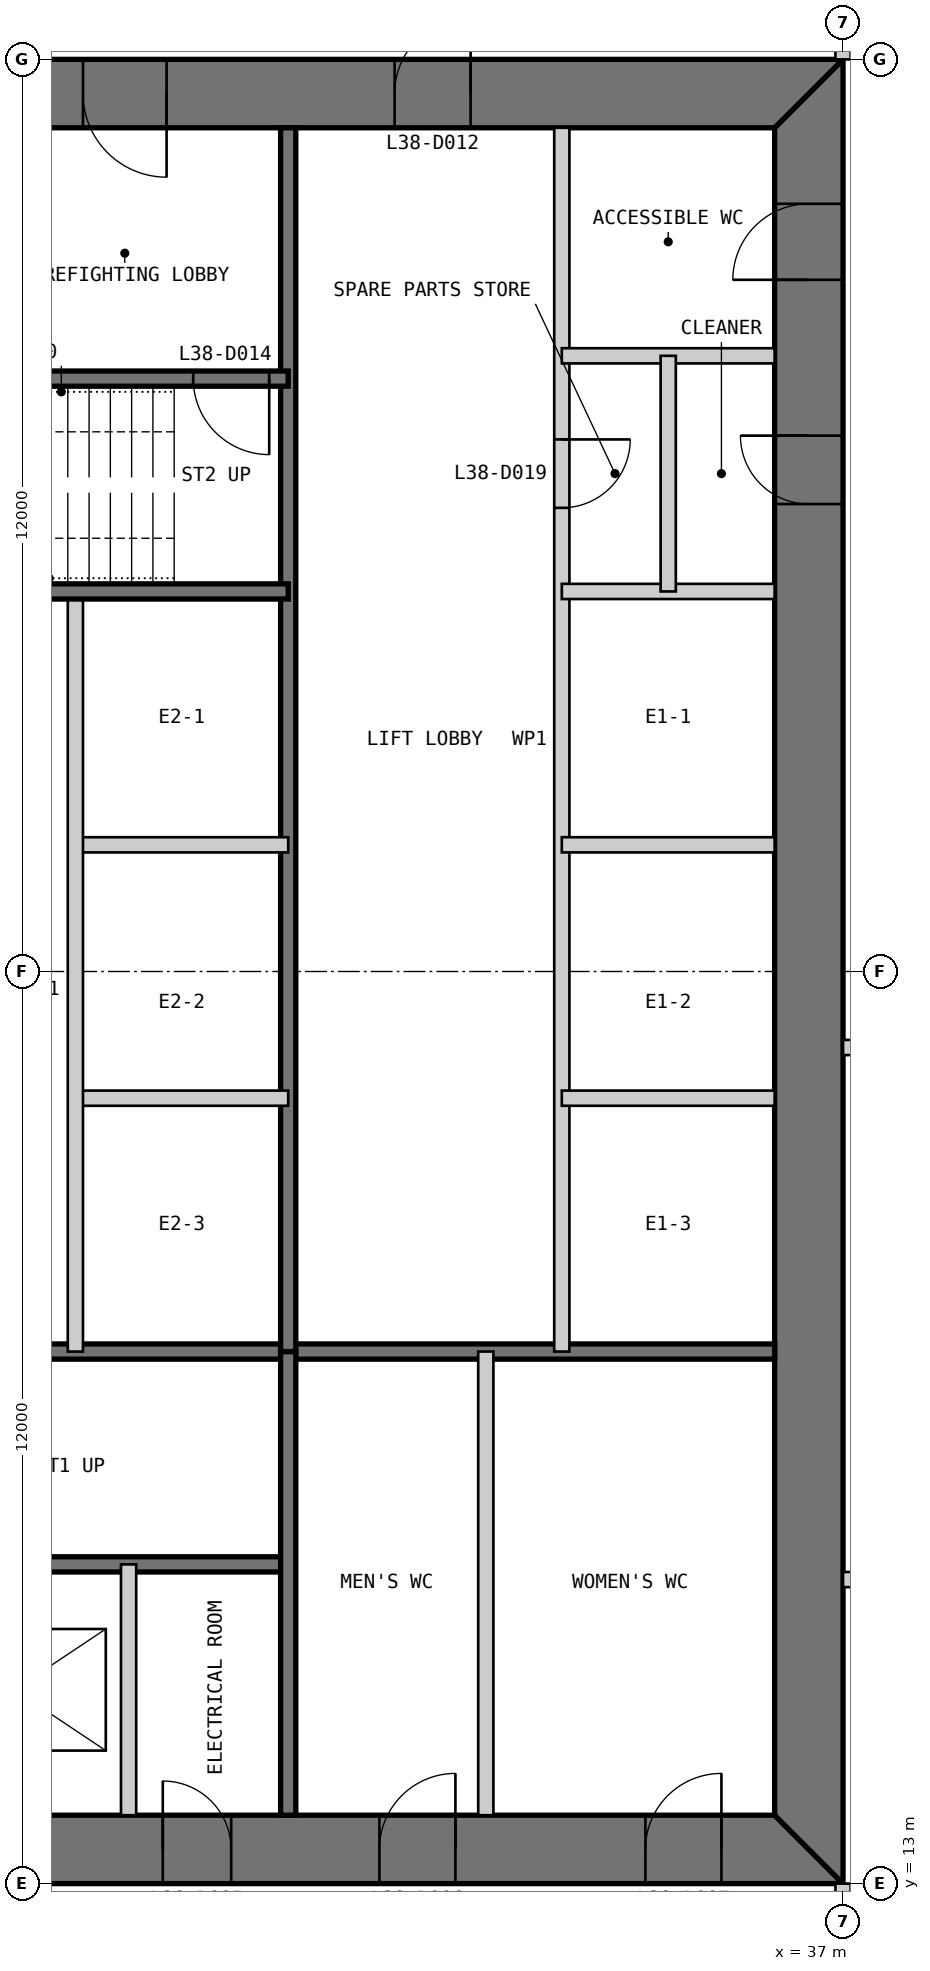
"""IFC4 building model, lengths in metres.
Left out: names, types, materials, properties, quantities, classifications, styles, units other than length and angle.
Written with IfcOpenShell. Run it as: python <this file> out.ifc"""

import sys

from ifc_helpers import new_model, si_unit, direction, frame, frame_2d, origin, place, context, subcontext, project, spatial, polyline, rectangle, outline, extrude, element, fill, save


model = new_model("IFC4")
c1 = context("Model", 3, precision=1e-05, world=origin(), true_north=direction((0.0, 1.0)))
c2 = subcontext(c1, "Body", "Model", "MODEL_VIEW")
j1 = project(units=[si_unit("LENGTHUNIT", "METRE"), si_unit("PLANEANGLEUNIT", "RADIAN")], contexts=[c1])
p1 = place(None, origin())
s1 = spatial("IfcSite", under=j1, at=p1, CompositionType="ELEMENT")
p2 = place(p1, origin())
s2 = spatial("IfcBuilding", under=s1, at=p2, CompositionType="ELEMENT")
p3 = place(p2, frame((0.0, 0.0, 162.4)))
s3 = spatial("IfcBuildingStorey", under=s2, at=p3, CompositionType="ELEMENT", Elevation=162.4)
p4 = place(p3, frame((13.0, 13.45, 0.0), z_axis=(0.0, 0.0, 1.0), x_axis=(1.0, 0.0, 0.0)))
e1 = element("IfcWall", 1, at=p4, inside=s3, PredefinedType="SHEAR", context=c2, shape_type="SweptSolid", body=[
    extrude(outline(polyline([(0.0, -0.45), (24.0, -0.45), (23.1, 0.45), (0.9, 0.45), (0.0, -0.45)])), origin(), (0.0, 0.0, 1.0), 6.0),
])
p5 = place(p4, frame((4.9, 0.0, 0.0)))
e2 = element("IfcOpeningElement", 2, at=p5, cuts=e1, PredefinedType="OPENING", context=c2, shape_type="SweptSolid", body=[
    extrude(rectangle(XDim=1.0, YDim=2.2, at=frame_2d((0.5, 1.1))), frame((0.0, 0.46, 0.0), z_axis=(0.0, -1.0, 0.0), x_axis=(1.0, 0.0, 0.0)), (0.0, 0.0, 1.0), 0.92),
])
p6 = place(p4, frame((8.9, 0.0, 0.0)))
e3 = element("IfcOpeningElement", 3, at=p6, cuts=e1, PredefinedType="OPENING", context=c2, shape_type="SweptSolid", body=[
    extrude(rectangle(XDim=1.1, YDim=2.2, at=frame_2d((0.55, 1.1))), frame((0.0, 0.46, 0.0), z_axis=(0.0, -1.0, 0.0), x_axis=(1.0, 0.0, 0.0)), (0.0, 0.0, 1.0), 0.92),
])
p7 = place(p4, frame((15.05, 0.0, 0.0)))
e4 = element("IfcOpeningElement", 4, at=p7, cuts=e1, PredefinedType="OPENING", context=c2, shape_type="SweptSolid", body=[
    extrude(rectangle(XDim=0.9, YDim=2.2, at=frame_2d((0.45, 1.1))), frame((0.0, 0.46, 0.0), z_axis=(0.0, -1.0, 0.0), x_axis=(1.0, 0.0, 0.0)), (0.0, 0.0, 1.0), 0.92),
])
p8 = place(p4, frame((17.9, 0.0, 0.0)))
e5 = element("IfcOpeningElement", 5, at=p8, cuts=e1, PredefinedType="OPENING", context=c2, shape_type="SweptSolid", body=[
    extrude(rectangle(XDim=1.0, YDim=2.2, at=frame_2d((0.5, 1.1))), frame((0.0, 0.46, 0.0), z_axis=(0.0, -1.0, 0.0), x_axis=(1.0, 0.0, 0.0)), (0.0, 0.0, 1.0), 0.92),
])
p9 = place(p4, frame((21.4, 0.0, 0.0)))
e6 = element("IfcOpeningElement", 6, at=p9, cuts=e1, PredefinedType="OPENING", context=c2, shape_type="SweptSolid", body=[
    extrude(rectangle(XDim=1.0, YDim=2.2, at=frame_2d((0.5, 1.1))), frame((0.0, 0.46, 0.0), z_axis=(0.0, -1.0, 0.0), x_axis=(1.0, 0.0, 0.0)), (0.0, 0.0, 1.0), 0.92),
])
p10 = place(p3, frame((36.55, 13.9, 0.0), z_axis=(0.0, 0.0, 1.0), x_axis=(0.0, 1.0, 0.0)))
e7 = element("IfcWall", 7, at=p10, inside=s3, PredefinedType="SHEAR", context=c2, shape_type="SweptSolid", body=[
    extrude(outline(polyline([(-0.9, -0.45), (23.1, -0.45), (22.2, 0.45), (0.0, 0.45), (-0.9, -0.45)])), origin(), (0.0, 0.0, 1.0), 6.0),
])
p11 = place(p10, frame((20.2, 0.0, 0.0)))
e8 = element("IfcOpeningElement", 8, at=p11, cuts=e7, PredefinedType="OPENING", context=c2, shape_type="SweptSolid", body=[
    extrude(rectangle(XDim=1.0, YDim=2.2, at=frame_2d((0.5, 1.1))), frame((0.0, 0.46, 0.0), z_axis=(0.0, -1.0, 0.0), x_axis=(1.0, 0.0, 0.0)), (0.0, 0.0, 1.0), 0.92),
])
p12 = place(p10, frame((17.25, 0.0, 0.0)))
e9 = element("IfcOpeningElement", 9, at=p12, cuts=e7, PredefinedType="OPENING", context=c2, shape_type="SweptSolid", body=[
    extrude(rectangle(XDim=0.9, YDim=2.2, at=frame_2d((0.45, 1.1))), frame((0.0, 0.46, 0.0), z_axis=(0.0, -1.0, 0.0), x_axis=(1.0, 0.0, 0.0)), (0.0, 0.0, 1.0), 0.92),
])
p13 = place(p3, frame((37.0, 36.55, 0.0), z_axis=(0.0, 0.0, 1.0), x_axis=(-1.0, 0.0, 0.0)))
e10 = element("IfcWall", 10, at=p13, inside=s3, PredefinedType="SHEAR", context=c2, shape_type="SweptSolid", body=[
    extrude(outline(polyline([(0.0, -0.45), (24.0, -0.45), (23.1, 0.45), (0.9, 0.45), (0.0, -0.45)])), origin(), (0.0, 0.0, 1.0), 6.0),
])
p14 = place(p13, frame((4.9, 0.0, 0.0)))
e11 = element("IfcOpeningElement", 11, at=p14, cuts=e10, PredefinedType="OPENING", context=c2, shape_type="SweptSolid", body=[
    extrude(rectangle(XDim=1.0, YDim=2.2, at=frame_2d((0.5, 1.1))), frame((0.0, 0.46, 0.0), z_axis=(0.0, -1.0, 0.0), x_axis=(1.0, 0.0, 0.0)), (0.0, 0.0, 1.0), 0.92),
])
p15 = place(p13, frame((8.9, 0.0, 0.0)))
e12 = element("IfcOpeningElement", 12, at=p15, cuts=e10, PredefinedType="OPENING", context=c2, shape_type="SweptSolid", body=[
    extrude(rectangle(XDim=1.1, YDim=2.2, at=frame_2d((0.55, 1.1))), frame((0.0, 0.46, 0.0), z_axis=(0.0, -1.0, 0.0), x_axis=(1.0, 0.0, 0.0)), (0.0, 0.0, 1.0), 0.92),
])
p16 = place(p13, frame((15.05, 0.0, 0.0)))
e13 = element("IfcOpeningElement", 13, at=p16, cuts=e10, PredefinedType="OPENING", context=c2, shape_type="SweptSolid", body=[
    extrude(rectangle(XDim=0.9, YDim=2.2, at=frame_2d((0.45, 1.1))), frame((0.0, 0.46, 0.0), z_axis=(0.0, -1.0, 0.0), x_axis=(1.0, 0.0, 0.0)), (0.0, 0.0, 1.0), 0.92),
])
p17 = place(p13, frame((17.9, 0.0, 0.0)))
e14 = element("IfcOpeningElement", 14, at=p17, cuts=e10, PredefinedType="OPENING", context=c2, shape_type="SweptSolid", body=[
    extrude(rectangle(XDim=1.0, YDim=2.2, at=frame_2d((0.5, 1.1))), frame((0.0, 0.46, 0.0), z_axis=(0.0, -1.0, 0.0), x_axis=(1.0, 0.0, 0.0)), (0.0, 0.0, 1.0), 0.92),
])
p18 = place(p13, frame((21.4, 0.0, 0.0)))
e15 = element("IfcOpeningElement", 15, at=p18, cuts=e10, PredefinedType="OPENING", context=c2, shape_type="SweptSolid", body=[
    extrude(rectangle(XDim=1.0, YDim=2.2, at=frame_2d((0.5, 1.1))), frame((0.0, 0.46, 0.0), z_axis=(0.0, -1.0, 0.0), x_axis=(1.0, 0.0, 0.0)), (0.0, 0.0, 1.0), 0.92),
])
p19 = place(p3, frame((20.3, 17.2, 0.0), z_axis=(0.0, 0.0, 1.0), x_axis=(1.0, 0.0, 0.0)))
e16 = element("IfcWall", 16, at=p19, inside=s3, PredefinedType="SOLIDWALL", context=c2, shape_type="SweptSolid", body=[
    extrude(rectangle(XDim=9.4, YDim=0.2, at=frame_2d((4.7, 0.0))), origin(), (0.0, 0.0, 1.0), 5.8),
])
p20 = place(p19, frame((0.25, 0.0, 0.0)))
e17 = element("IfcOpeningElement", 17, at=p20, cuts=e16, PredefinedType="OPENING", context=c2, shape_type="SweptSolid", body=[
    extrude(rectangle(XDim=1.0, YDim=2.2, at=frame_2d((0.5, 1.1))), frame((0.0, 0.11, 0.0), z_axis=(0.0, -1.0, 0.0), x_axis=(1.0, 0.0, 0.0)), (0.0, 0.0, 1.0), 0.22),
])
p21 = place(p3, frame((20.3, 20.0, 0.0), z_axis=(0.0, 0.0, 1.0), x_axis=(1.0, 0.0, 0.0)))
e18 = element("IfcWall", 18, at=p21, inside=s3, PredefinedType="SOLIDWALL", context=c2, shape_type="SweptSolid", body=[
    extrude(rectangle(XDim=15.8, YDim=0.2, at=frame_2d((7.9, 0.0))), origin(), (0.0, 0.0, 1.0), 5.8),
])
p22 = place(p3, frame((27.6, 13.9, 0.0), z_axis=(0.0, 0.0, 1.0), x_axis=(0.0, 1.0, 0.0)))
e19 = element("IfcWall", 19, at=p22, inside=s3, PredefinedType="PARTITIONING", context=c2, shape_type="SweptSolid", body=[
    extrude(rectangle(XDim=3.3, YDim=0.2, at=frame_2d((1.65, 0.0))), origin(), (0.0, 0.0, 1.0), 5.8),
])
p23 = place(p3, frame((29.7, 13.9, 0.0), z_axis=(0.0, 0.0, 1.0), x_axis=(0.0, 1.0, 0.0)))
e20 = element("IfcWall", 20, at=p23, inside=s3, PredefinedType="SOLIDWALL", context=c2, shape_type="SweptSolid", body=[
    extrude(rectangle(XDim=6.1, YDim=0.2, at=frame_2d((3.05, 0.0))), origin(), (0.0, 0.0, 1.0), 5.8),
])
p24 = place(p3, frame((32.3, 13.9, 0.0), z_axis=(0.0, 0.0, 1.0), x_axis=(0.0, 1.0, 0.0)))
e21 = element("IfcWall", 21, at=p24, inside=s3, PredefinedType="PARTITIONING", context=c2, shape_type="SweptSolid", body=[
    extrude(rectangle(XDim=6.1, YDim=0.2, at=frame_2d((3.05, 0.0))), origin(), (0.0, 0.0, 1.0), 5.8),
])
p25 = place(p3, frame((33.3, 36.1, 0.0), z_axis=(0.0, 0.0, 1.0), x_axis=(0.0, -1.0, 0.0)))
e22 = element("IfcWall", 22, at=p25, inside=s3, PredefinedType="PARTITIONING", context=c2, shape_type="SweptSolid", body=[
    extrude(rectangle(XDim=16.1, YDim=0.2, at=frame_2d((8.05, 0.0))), origin(), (0.0, 0.0, 1.0), 5.8),
])
p26 = place(p25, frame((4.1, 0.0, 0.0)))
e23 = element("IfcOpeningElement", 23, at=p26, cuts=e22, PredefinedType="OPENING", context=c2, shape_type="SweptSolid", body=[
    extrude(rectangle(XDim=0.9, YDim=2.2, at=frame_2d((0.45, 1.1))), frame((0.0, 0.11, 0.0), z_axis=(0.0, -1.0, 0.0), x_axis=(1.0, 0.0, 0.0)), (0.0, 0.0, 1.0), 0.22),
])
p27 = place(p3, frame((29.7, 36.1, 0.0), z_axis=(0.0, 0.0, 1.0), x_axis=(0.0, -1.0, 0.0)))
e24 = element("IfcWall", 24, at=p27, inside=s3, PredefinedType="SOLIDWALL", context=c2, shape_type="SweptSolid", body=[
    extrude(rectangle(XDim=16.1, YDim=0.2, at=frame_2d((8.05, 0.0))), origin(), (0.0, 0.0, 1.0), 5.8),
])
for number, where, z_axis, x_axis in (
    (25, (36.1, 30.0, 0.0), (0.0, 0.0, 1.0), (-1.0, 0.0, 0.0)),
    (26, (36.1, 26.667, 0.0), (0.0, 0.0, 1.0), (-1.0, 0.0, 0.0)),
    (27, (36.1, 23.333, 0.0), (0.0, 0.0, 1.0), (-1.0, 0.0, 0.0)),
    (28, (29.7, 26.667, 0.0), (0.0, 0.0, 1.0), (-1.0, 0.0, 0.0)),
    (29, (29.7, 23.333, 0.0), (0.0, 0.0, 1.0), (-1.0, 0.0, 0.0)),
):
    element("IfcWall", number, at=place(p3, frame(where, z_axis=z_axis, x_axis=x_axis)), inside=s3, PredefinedType="PARTITIONING", context=c2, shape_type="SweptSolid", body=[
        extrude(rectangle(XDim=2.8, YDim=0.2, at=frame_2d((1.4, 0.0))), origin(), (0.0, 0.0, 1.0), 5.8),
    ])
p28 = place(p3, frame((26.9, 30.0, 0.0), z_axis=(0.0, 0.0, 1.0), x_axis=(0.0, -1.0, 0.0)))
e30 = element("IfcWall", 30, at=p28, inside=s3, PredefinedType="PARTITIONING", context=c2, shape_type="SweptSolid", body=[
    extrude(rectangle(XDim=10.0, YDim=0.2, at=frame_2d((5.0, 0.0))), origin(), (0.0, 0.0, 1.0), 5.8),
])
p29 = place(p3, frame((29.7, 32.8, 0.0), z_axis=(0.0, 0.0, 1.0), x_axis=(-1.0, 0.0, 0.0)))
e31 = element("IfcWall", 31, at=p29, inside=s3, PredefinedType="SOLIDWALL", context=c2, shape_type="SweptSolid", body=[
    extrude(rectangle(XDim=9.4, YDim=0.2, at=frame_2d((4.7, 0.0))), origin(), (0.0, 0.0, 1.0), 5.8),
])
p30 = place(p29, frame((0.25, 0.0, 0.0)))
e32 = element("IfcOpeningElement", 32, at=p30, cuts=e31, PredefinedType="OPENING", context=c2, shape_type="SweptSolid", body=[
    extrude(rectangle(XDim=1.0, YDim=2.2, at=frame_2d((0.5, 1.1))), frame((0.0, 0.11, 0.0), z_axis=(0.0, -1.0, 0.0), x_axis=(1.0, 0.0, 0.0)), (0.0, 0.0, 1.0), 0.22),
])
p31 = place(p3, frame((29.7, 30.0, 0.0), z_axis=(0.0, 0.0, 1.0), x_axis=(-1.0, 0.0, 0.0)))
e33 = element("IfcWall", 33, at=p31, inside=s3, PredefinedType="SOLIDWALL", context=c2, shape_type="SweptSolid", body=[
    extrude(rectangle(XDim=15.8, YDim=0.2, at=frame_2d((7.9, 0.0))), origin(), (0.0, 0.0, 1.0), 5.8),
])
p32 = place(p3, frame((36.1, 33.1, 0.0), z_axis=(0.0, 0.0, 1.0), x_axis=(-1.0, 0.0, 0.0)))
e34 = element("IfcWall", 34, at=p32, inside=s3, PredefinedType="PARTITIONING", context=c2, shape_type="SweptSolid", body=[
    extrude(rectangle(XDim=2.8, YDim=0.2, at=frame_2d((1.4, 0.0))), origin(), (0.0, 0.0, 1.0), 5.8),
])
p33 = place(p3, frame((34.7, 33.1, 0.0), z_axis=(0.0, 0.0, 1.0), x_axis=(0.0, -1.0, 0.0)))
e35 = element("IfcWall", 35, at=p33, inside=s3, PredefinedType="PARTITIONING", context=c2, shape_type="SweptSolid", body=[
    extrude(rectangle(XDim=3.1, YDim=0.2, at=frame_2d((1.55, 0.0))), origin(), (0.0, 0.0, 1.0), 5.8),
])
p34 = place(p3, frame((37.0, 44.0, 0.0), z_axis=(0.0, 0.0, 1.0), x_axis=(0.0, -1.0, 0.0)))
e36 = element("IfcWall", 36, at=p34, inside=s3, PredefinedType="PARTITIONING", context=c2, shape_type="SweptSolid", body=[
    extrude(rectangle(XDim=7.0, YDim=0.2, at=frame_2d((3.5, 0.0))), origin(), (0.0, 0.0, 1.0), 4.807),
])
p35 = place(p3, frame((37.0, 10.6, 0.0), z_axis=(0.0, 0.0, 1.0), x_axis=(0.0, 1.0, 0.0)))
e37 = element("IfcWall", 37, at=p35, inside=s3, PredefinedType="PARTITIONING", context=c2, shape_type="SweptSolid", body=[
    extrude(rectangle(XDim=2.4, YDim=0.2, at=frame_2d((1.2, 0.0))), origin(), (0.0, 0.0, 1.0), 4.807),
])
p36 = place(p3, frame((37.0, 17.0, 0.0), z_axis=(0.0, 0.0, 1.0), x_axis=(1.0, 0.0, 0.0)))
e38 = element("IfcWall", 38, at=p36, inside=s3, PredefinedType="PARTITIONING", context=c2, shape_type="SweptSolid", body=[
    extrude(rectangle(XDim=11.0, YDim=0.2, at=frame_2d((5.5, 0.0))), origin(), (0.0, 0.0, 1.0), 5.8),
])
p37 = place(p36, frame((4.6, 0.0, 0.0)))
e39 = element("IfcOpeningElement", 39, at=p37, cuts=e38, PredefinedType="OPENING", context=c2, shape_type="SweptSolid", body=[
    extrude(rectangle(XDim=1.8, YDim=2.4, at=frame_2d((0.9, 1.2))), frame((0.0, 0.11, 0.0), z_axis=(0.0, -1.0, 0.0), x_axis=(1.0, 0.0, 0.0)), (0.0, 0.0, 1.0), 0.22),
])
p38 = place(p3, frame((37.0, 24.0, 0.0), z_axis=(0.0, 0.0, 1.0), x_axis=(1.0, 0.0, 0.0)))
e40 = element("IfcWall", 40, at=p38, inside=s3, PredefinedType="PARTITIONING", context=c2, shape_type="SweptSolid", body=[
    extrude(rectangle(XDim=11.0, YDim=0.2, at=frame_2d((5.5, 0.0))), origin(), (0.0, 0.0, 1.0), 5.8),
])
p39 = place(p38, frame((4.6, 0.0, 0.0)))
e41 = element("IfcOpeningElement", 41, at=p39, cuts=e40, PredefinedType="OPENING", context=c2, shape_type="SweptSolid", body=[
    extrude(rectangle(XDim=1.8, YDim=2.4, at=frame_2d((0.9, 1.2))), frame((0.0, 0.11, 0.0), z_axis=(0.0, -1.0, 0.0), x_axis=(1.0, 0.0, 0.0)), (0.0, 0.0, 1.0), 0.22),
])
p40 = place(p7, origin())
e42 = element("IfcDoor", 42, at=p40, inside=s3, OperationType="SINGLE_SWING_LEFT", PredefinedType="DOOR", context=c2, shape_type="SweptSolid", body=[
    extrude(rectangle(XDim=0.9, YDim=2.2, at=frame_2d((0.45, 1.1))), frame((0.0, 0.025, 0.0), z_axis=(0.0, -1.0, 0.0), x_axis=(1.0, 0.0, 0.0)), (0.0, 0.0, 1.0), 0.05),
    extrude(outline(polyline([(0.0, 0.0), (0.04, 0.0), (0.04, 2.16), (0.86, 2.16), (0.86, 0.0), (0.9, 0.0), (0.9, 2.2), (0.0, 2.2), (0.0, 0.0)])), frame((0.0, 0.3, 0.0), z_axis=(0.0, -1.0, 0.0), x_axis=(1.0, 0.0, 0.0)), (0.0, 0.0, 1.0), 0.6),
])
fill(e4, e42)
p41 = place(p8, origin())
e43 = element("IfcDoor", 43, at=p41, inside=s3, OperationType="SINGLE_SWING_RIGHT", PredefinedType="DOOR", context=c2, shape_type="SweptSolid", body=[
    extrude(rectangle(XDim=1.0, YDim=2.2, at=frame_2d((0.5, 1.1))), frame((0.0, 0.025, 0.0), z_axis=(0.0, -1.0, 0.0), x_axis=(1.0, 0.0, 0.0)), (0.0, 0.0, 1.0), 0.05),
    extrude(outline(polyline([(0.0, 0.0), (0.04, 0.0), (0.04, 2.16), (0.96, 2.16), (0.96, 0.0), (1.0, 0.0), (1.0, 2.2), (0.0, 2.2), (0.0, 0.0)])), frame((0.0, 0.3, 0.0), z_axis=(0.0, -1.0, 0.0), x_axis=(1.0, 0.0, 0.0)), (0.0, 0.0, 1.0), 0.6),
])
fill(e5, e43)
p42 = place(p9, origin())
e44 = element("IfcDoor", 44, at=p42, inside=s3, OperationType="SINGLE_SWING_RIGHT", PredefinedType="DOOR", context=c2, shape_type="SweptSolid", body=[
    extrude(rectangle(XDim=1.0, YDim=2.2, at=frame_2d((0.5, 1.1))), frame((0.0, 0.025, 0.0), z_axis=(0.0, -1.0, 0.0), x_axis=(1.0, 0.0, 0.0)), (0.0, 0.0, 1.0), 0.05),
    extrude(outline(polyline([(0.0, 0.0), (0.04, 0.0), (0.04, 2.16), (0.96, 2.16), (0.96, 0.0), (1.0, 0.0), (1.0, 2.2), (0.0, 2.2), (0.0, 0.0)])), frame((0.0, 0.3, 0.0), z_axis=(0.0, -1.0, 0.0), x_axis=(1.0, 0.0, 0.0)), (0.0, 0.0, 1.0), 0.6),
])
fill(e6, e44)
p43 = place(p14, frame((1.0, 0.0, 0.0), z_axis=(0.0, 0.0, 1.0), x_axis=(-1.0, 0.0, 0.0)))
e45 = element("IfcDoor", 45, at=p43, inside=s3, OperationType="SINGLE_SWING_RIGHT", PredefinedType="DOOR", context=c2, shape_type="SweptSolid", body=[
    extrude(rectangle(XDim=1.0, YDim=2.2, at=frame_2d((0.5, 1.1))), frame((0.0, 0.025, 0.0), z_axis=(0.0, -1.0, 0.0), x_axis=(1.0, 0.0, 0.0)), (0.0, 0.0, 1.0), 0.05),
    extrude(outline(polyline([(0.0, 0.0), (0.04, 0.0), (0.04, 2.16), (0.96, 2.16), (0.96, 0.0), (1.0, 0.0), (1.0, 2.2), (0.0, 2.2), (0.0, 0.0)])), frame((0.0, 0.3, 0.0), z_axis=(0.0, -1.0, 0.0), x_axis=(1.0, 0.0, 0.0)), (0.0, 0.0, 1.0), 0.6),
])
fill(e11, e45)
p44 = place(p15, origin())
e46 = element("IfcDoor", 46, at=p44, inside=s3, OperationType="SINGLE_SWING_LEFT", PredefinedType="DOOR", context=c2, shape_type="SweptSolid", body=[
    extrude(rectangle(XDim=1.1, YDim=2.2, at=frame_2d((0.55, 1.1))), frame((0.0, 0.025, 0.0), z_axis=(0.0, -1.0, 0.0), x_axis=(1.0, 0.0, 0.0)), (0.0, 0.0, 1.0), 0.05),
    extrude(outline(polyline([(0.0, 0.0), (0.04, 0.0), (0.04, 2.16), (1.06, 2.16), (1.06, 0.0), (1.1, 0.0), (1.1, 2.2), (0.0, 2.2), (0.0, 0.0)])), frame((0.0, 0.3, 0.0), z_axis=(0.0, -1.0, 0.0), x_axis=(1.0, 0.0, 0.0)), (0.0, 0.0, 1.0), 0.6),
])
fill(e12, e46)
p45 = place(p30, origin())
e47 = element("IfcDoor", 47, at=p45, inside=s3, OperationType="SINGLE_SWING_LEFT", PredefinedType="DOOR", context=c2, shape_type="SweptSolid", body=[
    extrude(rectangle(XDim=1.0, YDim=2.2, at=frame_2d((0.5, 1.1))), frame((0.0, 0.025, 0.0), z_axis=(0.0, -1.0, 0.0), x_axis=(1.0, 0.0, 0.0)), (0.0, 0.0, 1.0), 0.05),
])
fill(e32, e47)
p46 = place(p11, origin())
e48 = element("IfcDoor", 48, at=p46, inside=s3, OperationType="SINGLE_SWING_LEFT", PredefinedType="DOOR", context=c2, shape_type="SweptSolid", body=[
    extrude(rectangle(XDim=1.0, YDim=2.2, at=frame_2d((0.5, 1.1))), frame((0.0, 0.025, 0.0), z_axis=(0.0, -1.0, 0.0), x_axis=(1.0, 0.0, 0.0)), (0.0, 0.0, 1.0), 0.05),
    extrude(outline(polyline([(0.0, 0.0), (0.04, 0.0), (0.04, 2.16), (0.96, 2.16), (0.96, 0.0), (1.0, 0.0), (1.0, 2.2), (0.0, 2.2), (0.0, 0.0)])), frame((0.0, 0.3, 0.0), z_axis=(0.0, -1.0, 0.0), x_axis=(1.0, 0.0, 0.0)), (0.0, 0.0, 1.0), 0.6),
])
fill(e8, e48)
p47 = place(p26, origin())
e49 = element("IfcDoor", 49, at=p47, inside=s3, OperationType="SINGLE_SWING_LEFT", PredefinedType="DOOR", context=c2, shape_type="SweptSolid", body=[
    extrude(rectangle(XDim=0.9, YDim=2.2, at=frame_2d((0.45, 1.1))), frame((0.0, 0.025, 0.0), z_axis=(0.0, -1.0, 0.0), x_axis=(1.0, 0.0, 0.0)), (0.0, 0.0, 1.0), 0.05),
])
fill(e23, e49)
p48 = place(p12, origin())
e50 = element("IfcDoor", 50, at=p48, inside=s3, OperationType="SINGLE_SWING_RIGHT", PredefinedType="DOOR", context=c2, shape_type="SweptSolid", body=[
    extrude(rectangle(XDim=0.9, YDim=2.2, at=frame_2d((0.45, 1.1))), frame((0.0, 0.025, 0.0), z_axis=(0.0, -1.0, 0.0), x_axis=(1.0, 0.0, 0.0)), (0.0, 0.0, 1.0), 0.05),
    extrude(outline(polyline([(0.0, 0.0), (0.04, 0.0), (0.04, 2.16), (0.86, 2.16), (0.86, 0.0), (0.9, 0.0), (0.9, 2.2), (0.0, 2.2), (0.0, 0.0)])), frame((0.0, 0.3, 0.0), z_axis=(0.0, -1.0, 0.0), x_axis=(1.0, 0.0, 0.0)), (0.0, 0.0, 1.0), 0.6),
])
fill(e9, e50)
save(model, sys.argv[1])
